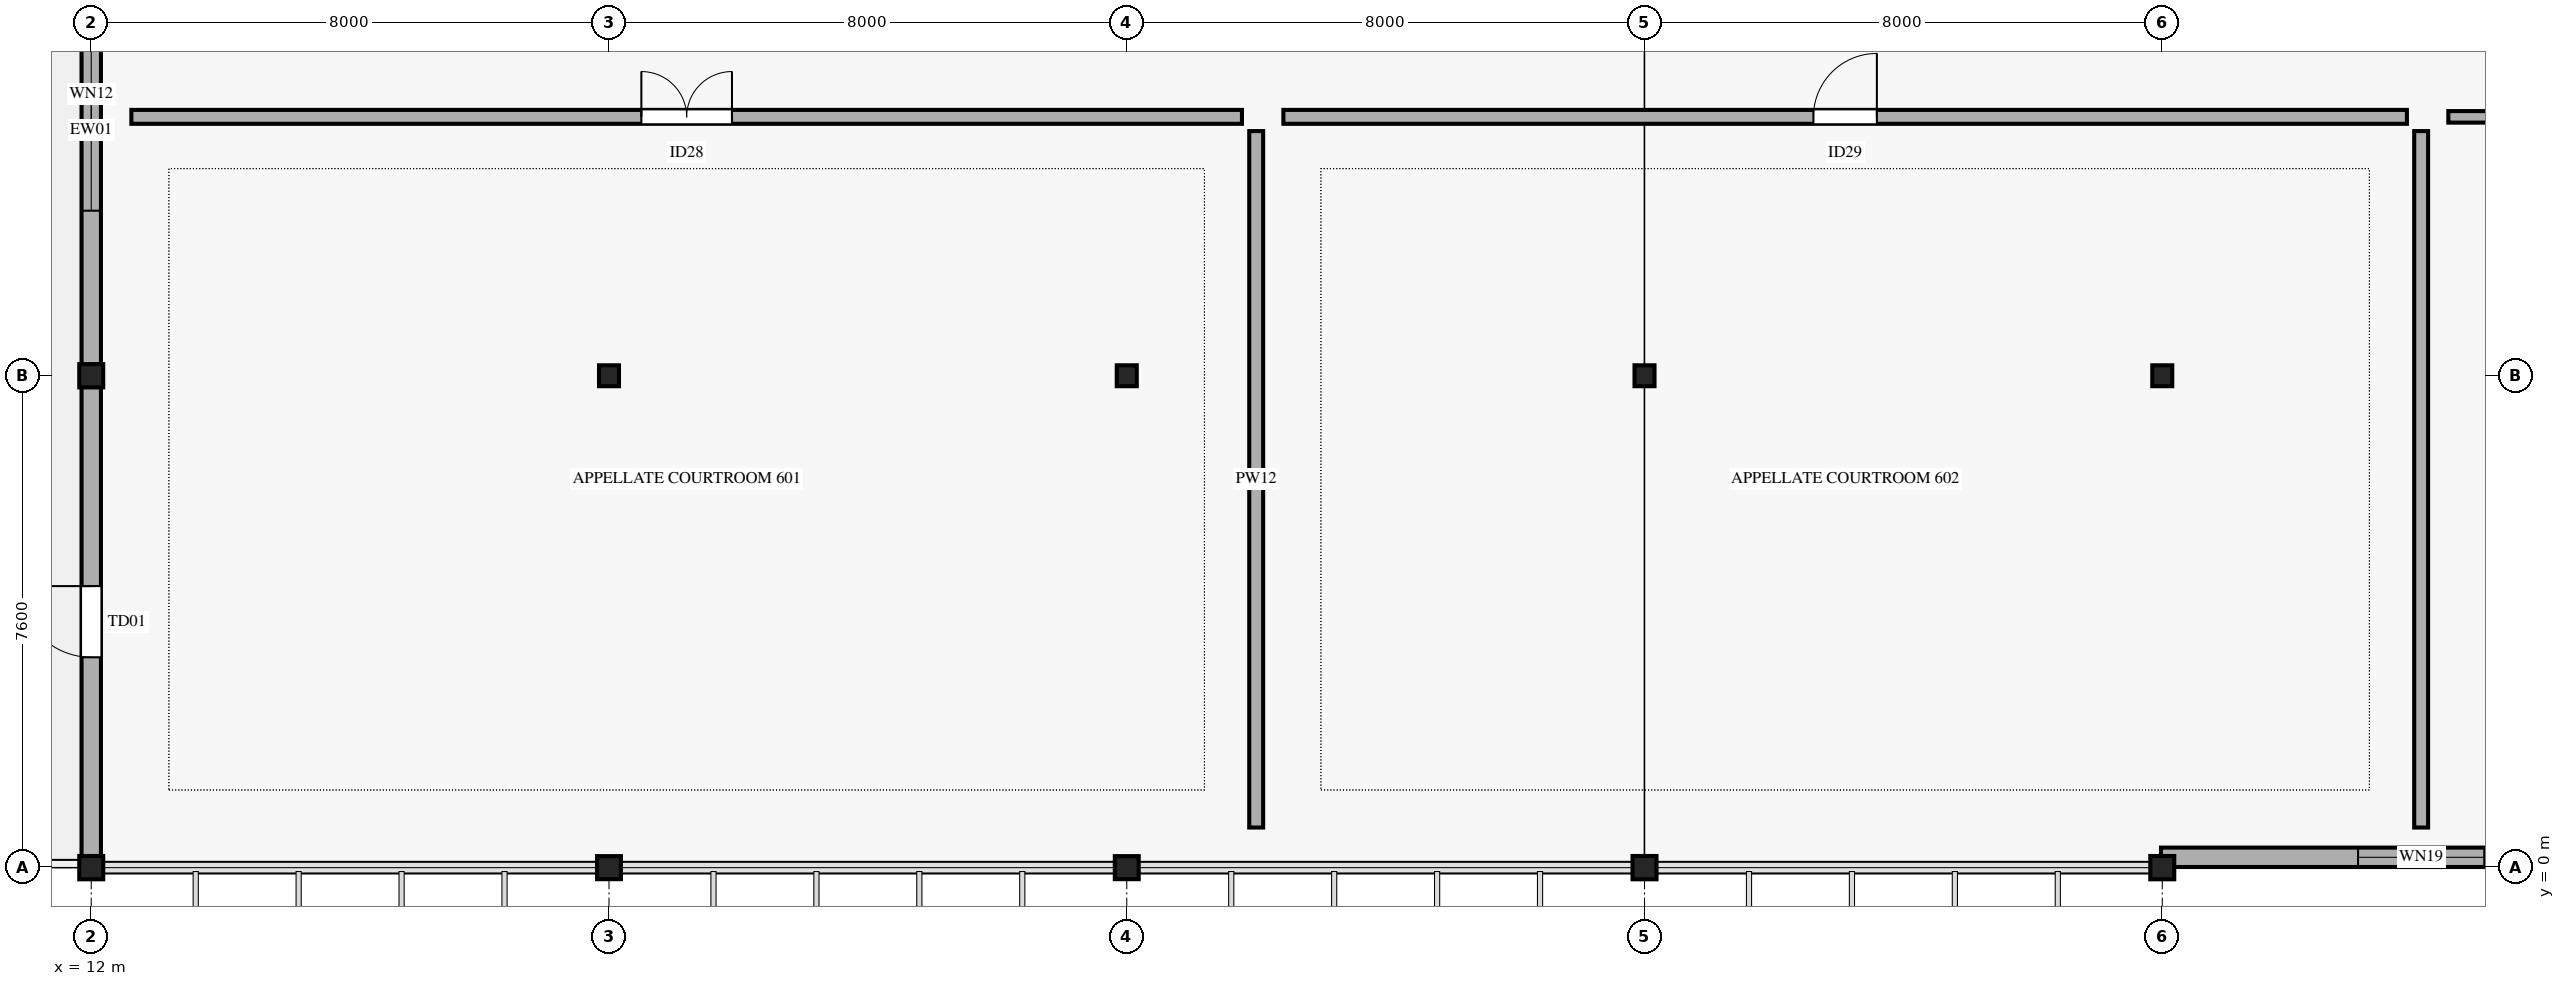
"""IFC4 building model, lengths in metres.
Left out: names, types, materials, properties, quantities, classifications, styles, units other than length and angle.
Written with IfcOpenShell. Run it as: python <this file> out.ifc"""

import sys

from ifc_helpers import new_model, si_unit, direction, frame, frame_2d, origin, origin_2d, place, context, subcontext, project, spatial, rectangle, i_section, extrude, element, fill, save


model = new_model("IFC4")
c1 = context("Model", 3, precision=1e-05, world=origin(), true_north=direction((0.0, 1.0)))
c2 = subcontext(c1, "Body", "Model", "MODEL_VIEW")
j1 = project(units=[si_unit("LENGTHUNIT", "METRE"), si_unit("PLANEANGLEUNIT", "RADIAN")], contexts=[c1])
p1 = place(None, origin())
s1 = spatial("IfcSite", under=j1, at=p1, CompositionType="ELEMENT")
p2 = place(p1, origin())
s2 = spatial("IfcBuilding", under=s1, at=p2, CompositionType="ELEMENT")
p3 = place(p2, frame((0.0, 0.0, 29.4)))
s3 = spatial("IfcBuildingStorey", under=s2, at=p3, CompositionType="ELEMENT", Elevation=29.4)
for number, where, z_axis, x_axis in (
    (1, (12.0, 0.0, 0.0), (0.0, 0.0, 1.0), (1.0, 0.0, 0.0)),
    (2, (12.0, 7.6, 0.0), (0.0, 0.0, 1.0), (1.0, 0.0, 0.0)),
):
    element("IfcColumn", number, at=place(p3, frame(where, z_axis=z_axis, x_axis=x_axis)), inside=s3, PredefinedType="COLUMN", context=c2, shape_type="SweptSolid", body=[
        extrude(i_section(OverallWidth=0.37, OverallDepth=0.36, WebThickness=0.012, FlangeThickness=0.02, FilletRadius=0.015, at=origin_2d()), origin(), (0.0, 0.0, 1.0), 4.0),
    ])
p4 = place(p3, frame((20.0, 0.0, 0.0), z_axis=(0.0, 0.0, 1.0), x_axis=(1.0, 0.0, 0.0)))
e3 = element("IfcColumn", 3, at=p4, inside=s3, PredefinedType="COLUMN", context=c2, shape_type="SweptSolid", body=[
    extrude(i_section(OverallWidth=0.369, OverallDepth=0.356, WebThickness=0.011, FlangeThickness=0.018, FilletRadius=0.015, at=origin_2d()), origin(), (0.0, 0.0, 1.0), 4.0),
])
p5 = place(p3, frame((20.0, 7.6, 0.0), z_axis=(0.0, 0.0, 1.0), x_axis=(1.0, 0.0, 0.0)))
e4 = element("IfcColumn", 4, at=p5, inside=s3, PredefinedType="COLUMN", context=c2, shape_type="SweptSolid", body=[
    extrude(i_section(OverallWidth=0.309, OverallDepth=0.323, WebThickness=0.014, FlangeThickness=0.023, FilletRadius=0.015, at=origin_2d()), origin(), (0.0, 0.0, 1.0), 4.0),
])
p6 = place(p3, frame((28.0, 0.0, 0.0), z_axis=(0.0, 0.0, 1.0), x_axis=(1.0, 0.0, 0.0)))
e5 = element("IfcColumn", 5, at=p6, inside=s3, PredefinedType="COLUMN", context=c2, shape_type="SweptSolid", body=[
    extrude(i_section(OverallWidth=0.369, OverallDepth=0.356, WebThickness=0.011, FlangeThickness=0.018, FilletRadius=0.015, at=origin_2d()), origin(), (0.0, 0.0, 1.0), 4.0),
])
p7 = place(p3, frame((28.0, 7.6, 0.0), z_axis=(0.0, 0.0, 1.0), x_axis=(1.0, 0.0, 0.0)))
e6 = element("IfcColumn", 6, at=p7, inside=s3, PredefinedType="COLUMN", context=c2, shape_type="SweptSolid", body=[
    extrude(i_section(OverallWidth=0.309, OverallDepth=0.323, WebThickness=0.014, FlangeThickness=0.023, FilletRadius=0.015, at=origin_2d()), origin(), (0.0, 0.0, 1.0), 4.0),
])
p8 = place(p3, frame((36.0, 0.0, 0.0), z_axis=(0.0, 0.0, 1.0), x_axis=(1.0, 0.0, 0.0)))
e7 = element("IfcColumn", 7, at=p8, inside=s3, PredefinedType="COLUMN", context=c2, shape_type="SweptSolid", body=[
    extrude(i_section(OverallWidth=0.37, OverallDepth=0.36, WebThickness=0.012, FlangeThickness=0.02, FilletRadius=0.015, at=origin_2d()), origin(), (0.0, 0.0, 1.0), 4.0),
])
p9 = place(p3, frame((36.0, 7.6, 0.0), z_axis=(0.0, 0.0, 1.0), x_axis=(1.0, 0.0, 0.0)))
e8 = element("IfcColumn", 8, at=p9, inside=s3, PredefinedType="COLUMN", context=c2, shape_type="SweptSolid", body=[
    extrude(i_section(OverallWidth=0.309, OverallDepth=0.323, WebThickness=0.014, FlangeThickness=0.023, FilletRadius=0.015, at=origin_2d()), origin(), (0.0, 0.0, 1.0), 4.0),
])
p10 = place(p3, frame((44.0, 0.0, 0.0), z_axis=(0.0, 0.0, 1.0), x_axis=(1.0, 0.0, 0.0)))
e9 = element("IfcColumn", 9, at=p10, inside=s3, PredefinedType="COLUMN", context=c2, shape_type="SweptSolid", body=[
    extrude(i_section(OverallWidth=0.37, OverallDepth=0.36, WebThickness=0.012, FlangeThickness=0.02, FilletRadius=0.015, at=origin_2d()), origin(), (0.0, 0.0, 1.0), 4.0),
])
p11 = place(p3, frame((44.0, 7.6, 0.0), z_axis=(0.0, 0.0, 1.0), x_axis=(1.0, 0.0, 0.0)))
e10 = element("IfcColumn", 10, at=p11, inside=s3, PredefinedType="COLUMN", context=c2, shape_type="SweptSolid", body=[
    extrude(i_section(OverallWidth=0.309, OverallDepth=0.323, WebThickness=0.014, FlangeThickness=0.023, FilletRadius=0.015, at=origin_2d()), origin(), (0.0, 0.0, 1.0), 4.0),
])
p12 = place(p3, frame((12.0, -0.02, 0.0), z_axis=(0.0, 0.0, 1.0), x_axis=(0.0, 1.0, 0.0)))
e11 = element("IfcWall", 11, at=p12, inside=s3, PredefinedType="STANDARD", context=c2, shape_type="SweptSolid", body=[
    extrude(rectangle(XDim=7.64, YDim=0.3, at=frame_2d((3.82, 0.0))), origin(), (0.0, 0.0, 1.0), 3.06),
])
p13 = place(p12, frame((3.27, 0.0, 0.0)))
e12 = element("IfcOpeningElement", 12, at=p13, cuts=e11, PredefinedType="OPENING", context=c2, shape_type="SweptSolid", body=[
    extrude(rectangle(XDim=1.1, YDim=2.2, at=frame_2d((0.55, 1.1))), frame((0.0, 0.16, 0.0), z_axis=(0.0, -1.0, 0.0), x_axis=(1.0, 0.0, 0.0)), (0.0, 0.0, 1.0), 0.32),
])
p14 = place(p3, frame((12.0, 7.58, 0.0), z_axis=(0.0, 0.0, 1.0), x_axis=(0.0, 1.0, 0.0)))
e13 = element("IfcWall", 13, at=p14, inside=s3, PredefinedType="STANDARD", context=c2, shape_type="SweptSolid", body=[
    extrude(rectangle(XDim=7.64, YDim=0.3, at=frame_2d((3.82, 0.0))), origin(), (0.0, 0.0, 1.0), 3.06),
])
p15 = place(p14, frame((2.57, 0.0, 0.75)))
e14 = element("IfcOpeningElement", 14, at=p15, cuts=e13, PredefinedType="OPENING", context=c2, shape_type="SweptSolid", body=[
    extrude(rectangle(XDim=2.5, YDim=2.15, at=frame_2d((1.25, 1.075))), frame((0.0, 0.16, 0.0), z_axis=(0.0, -1.0, 0.0), x_axis=(1.0, 0.0, 0.0)), (0.0, 0.0, 1.0), 0.32),
])
p16 = place(p3, frame((52.02, 0.16, 0.0), z_axis=(0.0, 0.0, 1.0), x_axis=(-1.0, 0.0, 0.0)))
e15 = element("IfcWall", 15, at=p16, inside=s3, PredefinedType="STANDARD", context=c2, shape_type="SweptSolid", body=[
    extrude(rectangle(XDim=8.04, YDim=0.3, at=frame_2d((4.02, 0.0))), origin(), (0.0, 0.0, 1.0), 3.06),
])
p17 = place(p16, frame((3.045, 0.0, 0.75)))
e16 = element("IfcOpeningElement", 16, at=p17, cuts=e15, PredefinedType="OPENING", context=c2, shape_type="SweptSolid", body=[
    extrude(rectangle(XDim=1.95, YDim=1.8, at=frame_2d((0.975, 0.9))), frame((0.0, 0.16, 0.0), z_axis=(0.0, -1.0, 0.0), x_axis=(1.0, 0.0, 0.0)), (0.0, 0.0, 1.0), 0.32),
])
p18 = place(p3, frame((12.62, 11.6, 0.0), z_axis=(0.0, 0.0, 1.0), x_axis=(1.0, 0.0, 0.0)))
e17 = element("IfcWall", 17, at=p18, inside=s3, PredefinedType="PARTITIONING", context=c2, shape_type="SweptSolid", body=[
    extrude(rectangle(XDim=17.16, YDim=0.215, at=frame_2d((8.58, 0.0))), origin(), (0.0, 0.0, 1.0), 2.85),
])
p19 = place(p18, frame((7.88, 0.0, 0.0)))
e18 = element("IfcOpeningElement", 18, at=p19, cuts=e17, PredefinedType="OPENING", context=c2, shape_type="SweptSolid", body=[
    extrude(rectangle(XDim=1.4, YDim=2.3, at=frame_2d((0.7, 1.15))), frame((0.0, 0.117, 0.0), z_axis=(0.0, -1.0, 0.0), x_axis=(1.0, 0.0, 0.0)), (0.0, 0.0, 1.0), 0.235),
])
p20 = place(p3, frame((30.0, 0.62, 0.0), z_axis=(0.0, 0.0, 1.0), x_axis=(0.0, 1.0, 0.0)))
e19 = element("IfcWall", 19, at=p20, inside=s3, PredefinedType="PARTITIONING", context=c2, shape_type="SweptSolid", body=[
    extrude(rectangle(XDim=10.76, YDim=0.215, at=frame_2d((5.38, 0.0))), origin(), (0.0, 0.0, 1.0), 2.85),
])
p21 = place(p3, frame((30.42, 11.6, 0.0), z_axis=(0.0, 0.0, 1.0), x_axis=(1.0, 0.0, 0.0)))
e20 = element("IfcWall", 20, at=p21, inside=s3, PredefinedType="PARTITIONING", context=c2, shape_type="SweptSolid", body=[
    extrude(rectangle(XDim=17.36, YDim=0.215, at=frame_2d((8.68, 0.0))), origin(), (0.0, 0.0, 1.0), 2.85),
])
p22 = place(p21, frame((8.19, 0.0, 0.0)))
e21 = element("IfcOpeningElement", 21, at=p22, cuts=e20, PredefinedType="OPENING", context=c2, shape_type="SweptSolid", body=[
    extrude(rectangle(XDim=0.98, YDim=2.25, at=frame_2d((0.49, 1.125))), frame((0.0, 0.117, 0.0), z_axis=(0.0, -1.0, 0.0), x_axis=(1.0, 0.0, 0.0)), (0.0, 0.0, 1.0), 0.235),
])
p23 = place(p3, frame((48.0, 0.62, 0.0), z_axis=(0.0, 0.0, 1.0), x_axis=(0.0, 1.0, 0.0)))
e22 = element("IfcWall", 22, at=p23, inside=s3, PredefinedType="PARTITIONING", context=c2, shape_type="SweptSolid", body=[
    extrude(rectangle(XDim=10.76, YDim=0.215, at=frame_2d((5.38, 0.0))), origin(), (0.0, 0.0, 1.0), 2.85),
])
p24 = place(p3, frame((48.42, 11.6, 0.0), z_axis=(0.0, 0.0, 1.0), x_axis=(1.0, 0.0, 0.0)))
e23 = element("IfcWall", 23, at=p24, inside=s3, PredefinedType="PARTITIONING", context=c2, shape_type="SweptSolid", body=[
    extrude(rectangle(XDim=17.36, YDim=0.178, at=frame_2d((8.68, 0.0))), origin(), (0.0, 0.0, 1.0), 2.85),
])
p25 = place(p24, frame((8.02, 0.0, 0.0)))
e24 = element("IfcOpeningElement", 24, at=p25, cuts=e23, PredefinedType="OPENING", context=c2, shape_type="SweptSolid", body=[
    extrude(rectangle(XDim=1.32, YDim=2.3, at=frame_2d((0.66, 1.15))), frame((0.0, 0.099, 0.0), z_axis=(0.0, -1.0, 0.0), x_axis=(1.0, 0.0, 0.0)), (0.0, 0.0, 1.0), 0.198),
])
p26 = place(p13, origin())
e25 = element("IfcDoor", 25, at=p26, inside=s3, OperationType="SINGLE_SWING_RIGHT", PredefinedType="DOOR", context=c2, shape_type="SweptSolid", body=[
    extrude(rectangle(XDim=1.1, YDim=2.2, at=frame_2d((0.55, 1.1))), frame((0.0, 0.025, 0.0), z_axis=(0.0, -1.0, 0.0), x_axis=(1.0, 0.0, 0.0)), (0.0, 0.0, 1.0), 0.05),
])
fill(e12, e25)
p27 = place(p15, origin())
e26 = element("IfcWindow", 26, at=p27, inside=s3, PartitioningType="SINGLE_PANEL", PredefinedType="WINDOW", context=c2, shape_type="SweptSolid", body=[
    extrude(rectangle(XDim=2.5, YDim=2.15, at=frame_2d((1.25, 1.075))), frame((0.0, 0.03, 0.0), z_axis=(0.0, -1.0, 0.0), x_axis=(1.0, 0.0, 0.0)), (0.0, 0.0, 1.0), 0.06),
])
fill(e14, e26)
p28 = place(p17, origin())
e27 = element("IfcWindow", 27, at=p28, inside=s3, PartitioningType="SINGLE_PANEL", PredefinedType="WINDOW", context=c2, shape_type="SweptSolid", body=[
    extrude(rectangle(XDim=1.95, YDim=1.8, at=frame_2d((0.975, 0.9))), frame((0.0, 0.03, 0.0), z_axis=(0.0, -1.0, 0.0), x_axis=(1.0, 0.0, 0.0)), (0.0, 0.0, 1.0), 0.06),
])
fill(e16, e27)
p29 = place(p19, origin())
e28 = element("IfcDoor", 28, at=p29, inside=s3, OperationType="DOUBLE_DOOR_SINGLE_SWING", PredefinedType="DOOR", context=c2, shape_type="SweptSolid", body=[
    extrude(rectangle(XDim=1.4, YDim=2.3, at=frame_2d((0.7, 1.15))), frame((0.0, 0.025, 0.0), z_axis=(0.0, -1.0, 0.0), x_axis=(1.0, 0.0, 0.0)), (0.0, 0.0, 1.0), 0.05),
])
fill(e18, e28)
p30 = place(p22, origin())
e29 = element("IfcDoor", 29, at=p30, inside=s3, OperationType="SINGLE_SWING_RIGHT", PredefinedType="DOOR", context=c2, shape_type="SweptSolid", body=[
    extrude(rectangle(XDim=0.98, YDim=2.25, at=frame_2d((0.49, 1.125))), frame((0.0, 0.025, 0.0), z_axis=(0.0, -1.0, 0.0), x_axis=(1.0, 0.0, 0.0)), (0.0, 0.0, 1.0), 0.05),
])
fill(e21, e29)
save(model, sys.argv[1])
